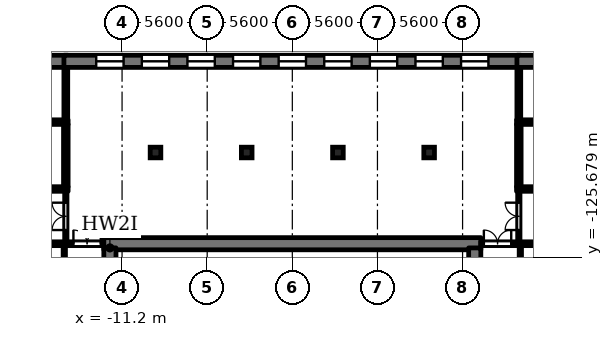
"""IFC4 building model, lengths in metres.
Left out: names, types, materials, properties, quantities, classifications, styles, units other than length and angle.
Written with IfcOpenShell. Run it as: python <this file> out.ifc"""

import sys

from ifc_helpers import new_model, si_unit, direction, frame, frame_2d, origin, origin_2d, place, context, subcontext, project, spatial, rectangle, extrude, element, fill, save


model = new_model("IFC4")
c1 = context("Model", 3, precision=1e-05, world=origin(), true_north=direction((0.0, 1.0)))
c2 = subcontext(c1, "Body", "Model", "MODEL_VIEW")
j1 = project(units=[si_unit("LENGTHUNIT", "METRE"), si_unit("PLANEANGLEUNIT", "RADIAN")], contexts=[c1])
p1 = place(None, origin())
s1 = spatial("IfcSite", under=j1, at=p1, CompositionType="ELEMENT")
p2 = place(p1, origin())
s2 = spatial("IfcBuilding", under=s1, at=p2, CompositionType="ELEMENT")
p3 = place(p2, frame((0.0, 0.0, 16.1)))
s3 = spatial("IfcBuildingStorey", under=s2, at=p3, CompositionType="ELEMENT", Elevation=16.1)
for number, where, z_axis, x_axis in (
    (1, (-9.0, -118.8, 0.0), (0.0, 0.0, 1.0), (1.0, 0.0, 0.0)),
    (2, (-3.0, -118.8, 0.0), (0.0, 0.0, 1.0), (1.0, 0.0, 0.0)),
    (3, (3.0, -118.8, 0.0), (0.0, 0.0, 1.0), (1.0, 0.0, 0.0)),
    (4, (9.0, -118.8, 0.0), (0.0, 0.0, 1.0), (1.0, 0.0, 0.0)),
):
    element("IfcColumn", number, at=place(p3, frame(where, z_axis=z_axis, x_axis=x_axis)), inside=s3, PredefinedType="COLUMN", context=c2, shape_type="SweptSolid", body=[
        extrude(rectangle(XDim=0.7, YDim=0.7, at=origin_2d()), origin(), (0.0, 0.0, 1.0), 4.45),
    ])
p4 = place(p3, frame((-29.2, -124.8, 0.0), z_axis=(0.0, 0.0, 1.0), x_axis=(1.0, 0.0, 0.0)))
e5 = element("IfcWall", 5, at=p4, inside=s3, PredefinedType="SOLIDWALL", context=c2, shape_type="SweptSolid", body=[
    extrude(rectangle(XDim=16.8, YDim=0.25, at=frame_2d((8.4, 0.0))), origin(), (0.0, 0.0, 1.0), 4.45),
])
p5 = place(p4, frame((14.8, 0.0, 0.0)))
e6 = element("IfcOpeningElement", 6, at=p5, cuts=e5, PredefinedType="OPENING", context=c2, shape_type="SweptSolid", body=[
    extrude(rectangle(XDim=1.8, YDim=2.1, at=frame_2d((0.9, 1.05))), frame((0.0, 0.135, 0.0), z_axis=(0.0, -1.0, 0.0), x_axis=(1.0, 0.0, 0.0)), (0.0, 0.0, 1.0), 0.27),
])
p6 = place(p3, frame((-12.4, -124.8, 0.0), z_axis=(0.0, 0.0, 1.0), x_axis=(1.0, 0.0, 0.0)))
e7 = element("IfcWall", 7, at=p6, inside=s3, PredefinedType="SOLIDWALL", context=c2, shape_type="SweptSolid", body=[
    extrude(rectangle(XDim=24.8, YDim=0.8, at=frame_2d((12.4, 0.0))), origin(), (0.0, 0.0, 1.0), 4.8),
])
p7 = place(p3, frame((12.4, -124.8, 0.0), z_axis=(0.0, 0.0, 1.0), x_axis=(1.0, 0.0, 0.0)))
e8 = element("IfcWall", 8, at=p7, inside=s3, PredefinedType="SOLIDWALL", context=c2, shape_type="SweptSolid", body=[
    extrude(rectangle(XDim=16.8, YDim=0.25, at=frame_2d((8.4, 0.0))), origin(), (0.0, 0.0, 1.0), 4.45),
])
p8 = place(p7, frame((0.2, 0.0, 0.0)))
e9 = element("IfcOpeningElement", 9, at=p8, cuts=e8, PredefinedType="OPENING", context=c2, shape_type="SweptSolid", body=[
    extrude(rectangle(XDim=1.8, YDim=2.1, at=frame_2d((0.9, 1.05))), frame((0.0, 0.135, 0.0), z_axis=(0.0, -1.0, 0.0), x_axis=(1.0, 0.0, 0.0)), (0.0, 0.0, 1.0), 0.27),
])
p9 = place(p3, frame((-29.2, -121.2, 0.0), z_axis=(0.0, 0.0, 1.0), x_axis=(1.0, 0.0, 0.0)))
e10 = element("IfcWall", 10, at=p9, inside=s3, PredefinedType="SOLIDWALL", context=c2, shape_type="SweptSolid", body=[
    extrude(rectangle(XDim=14.45, YDim=0.3, at=frame_2d((7.225, 0.0))), origin(), (0.0, 0.0, 1.0), 4.45),
])
p10 = place(p9, frame((4.0, 0.0, 0.0)))
e11 = element("IfcOpeningElement", 11, at=p10, cuts=e10, PredefinedType="OPENING", context=c2, shape_type="SweptSolid", body=[
    extrude(rectangle(XDim=1.1, YDim=2.1, at=frame_2d((0.55, 1.05))), frame((0.0, 0.16, 0.0), z_axis=(0.0, -1.0, 0.0), x_axis=(1.0, 0.0, 0.0)), (0.0, 0.0, 1.0), 0.32),
])
p11 = place(p9, frame((6.5, 0.0, 0.0)))
e12 = element("IfcOpeningElement", 12, at=p11, cuts=e10, PredefinedType="OPENING", context=c2, shape_type="SweptSolid", body=[
    extrude(rectangle(XDim=1.1, YDim=2.1, at=frame_2d((0.55, 1.05))), frame((0.0, 0.16, 0.0), z_axis=(0.0, -1.0, 0.0), x_axis=(1.0, 0.0, 0.0)), (0.0, 0.0, 1.0), 0.32),
])
p12 = place(p9, frame((0.95, 0.0, 0.0)))
e13 = element("IfcOpeningElement", 13, at=p12, cuts=e10, PredefinedType="OPENING", context=c2, shape_type="SweptSolid", body=[
    extrude(rectangle(XDim=1.1, YDim=2.1, at=frame_2d((0.55, 1.05))), frame((0.0, 0.16, 0.0), z_axis=(0.0, -1.0, 0.0), x_axis=(1.0, 0.0, 0.0)), (0.0, 0.0, 1.0), 0.32),
])
p13 = place(p9, frame((10.8, 0.0, 0.0)))
e14 = element("IfcOpeningElement", 14, at=p13, cuts=e10, PredefinedType="OPENING", context=c2, shape_type="SweptSolid", body=[
    extrude(rectangle(XDim=1.0, YDim=2.1, at=frame_2d((0.5, 1.05))), frame((0.0, 0.16, 0.0), z_axis=(0.0, -1.0, 0.0), x_axis=(1.0, 0.0, 0.0)), (0.0, 0.0, 1.0), 0.32),
])
p14 = place(p3, frame((14.75, -121.2, 0.0), z_axis=(0.0, 0.0, 1.0), x_axis=(1.0, 0.0, 0.0)))
e15 = element("IfcWall", 15, at=p14, inside=s3, PredefinedType="SOLIDWALL", context=c2, shape_type="SweptSolid", body=[
    extrude(rectangle(XDim=14.45, YDim=0.3, at=frame_2d((7.225, 0.0))), origin(), (0.0, 0.0, 1.0), 4.45),
])
p15 = place(p14, frame((6.85, 0.0, 0.0)))
e16 = element("IfcOpeningElement", 16, at=p15, cuts=e15, PredefinedType="OPENING", context=c2, shape_type="SweptSolid", body=[
    extrude(rectangle(XDim=1.1, YDim=2.1, at=frame_2d((0.55, 1.05))), frame((0.0, 0.16, 0.0), z_axis=(0.0, -1.0, 0.0), x_axis=(1.0, 0.0, 0.0)), (0.0, 0.0, 1.0), 0.32),
])
p16 = place(p14, frame((9.35, 0.0, 0.0)))
e17 = element("IfcOpeningElement", 17, at=p16, cuts=e15, PredefinedType="OPENING", context=c2, shape_type="SweptSolid", body=[
    extrude(rectangle(XDim=1.1, YDim=2.1, at=frame_2d((0.55, 1.05))), frame((0.0, 0.16, 0.0), z_axis=(0.0, -1.0, 0.0), x_axis=(1.0, 0.0, 0.0)), (0.0, 0.0, 1.0), 0.32),
])
p17 = place(p14, frame((12.4, 0.0, 0.0)))
e18 = element("IfcOpeningElement", 18, at=p17, cuts=e15, PredefinedType="OPENING", context=c2, shape_type="SweptSolid", body=[
    extrude(rectangle(XDim=1.1, YDim=2.1, at=frame_2d((0.55, 1.05))), frame((0.0, 0.16, 0.0), z_axis=(0.0, -1.0, 0.0), x_axis=(1.0, 0.0, 0.0)), (0.0, 0.0, 1.0), 0.32),
])
p18 = place(p14, frame((2.65, 0.0, 0.0)))
e19 = element("IfcOpeningElement", 19, at=p18, cuts=e15, PredefinedType="OPENING", context=c2, shape_type="SweptSolid", body=[
    extrude(rectangle(XDim=1.0, YDim=2.1, at=frame_2d((0.5, 1.05))), frame((0.0, 0.16, 0.0), z_axis=(0.0, -1.0, 0.0), x_axis=(1.0, 0.0, 0.0)), (0.0, 0.0, 1.0), 0.32),
])
for number, where, z_axis, x_axis in (
    (20, (-25.75, -116.8, 0.0), (0.0, 0.0, 1.0), (1.0, 0.0, 0.0)),
    (21, (14.75, -116.8, 0.0), (0.0, 0.0, 1.0), (1.0, 0.0, 0.0)),
):
    element("IfcWall", number, at=place(p3, frame(where, z_axis=z_axis, x_axis=x_axis)), inside=s3, PredefinedType="SOLIDWALL", context=c2, shape_type="SweptSolid", body=[
        extrude(rectangle(XDim=11.0, YDim=0.3, at=frame_2d((5.5, 0.0))), origin(), (0.0, 0.0, 1.0), 4.45),
    ])
p19 = place(p3, frame((-26.05, -112.8, 0.0), z_axis=(0.0, 0.0, 1.0), x_axis=(1.0, 0.0, 0.0)))
e22 = element("IfcWall", 22, at=p19, inside=s3, PredefinedType="SOLIDWALL", context=c2, shape_type="SweptSolid", body=[
    extrude(rectangle(XDim=11.275, YDim=0.8, at=frame_2d((5.637, 0.0))), origin(), (0.0, 0.0, 1.0), 4.45),
])
p20 = place(p3, frame((-15.025, -112.8, 0.0), z_axis=(0.0, 0.0, 1.0), x_axis=(1.0, 0.0, 0.0)))
e23 = element("IfcWall", 23, at=p20, inside=s3, PredefinedType="SOLIDWALL", context=c2, shape_type="SweptSolid", body=[
    extrude(rectangle(XDim=30.05, YDim=0.8, at=frame_2d((15.025, 0.0))), origin(), (0.0, 0.0, 1.0), 4.45),
])
p21 = place(p20, frame((2.125, 0.0, 0.9)))
e24 = element("IfcOpeningElement", 24, at=p21, cuts=e23, PredefinedType="OPENING", context=c2, shape_type="SweptSolid", body=[
    extrude(rectangle(XDim=1.8, YDim=1.5, at=frame_2d((0.9, 0.75))), frame((0.0, 0.41, 0.0), z_axis=(0.0, -1.0, 0.0), x_axis=(1.0, 0.0, 0.0)), (0.0, 0.0, 1.0), 0.82),
])
p22 = place(p20, frame((5.125, 0.0, 0.9)))
e25 = element("IfcOpeningElement", 25, at=p22, cuts=e23, PredefinedType="OPENING", context=c2, shape_type="SweptSolid", body=[
    extrude(rectangle(XDim=1.8, YDim=1.5, at=frame_2d((0.9, 0.75))), frame((0.0, 0.41, 0.0), z_axis=(0.0, -1.0, 0.0), x_axis=(1.0, 0.0, 0.0)), (0.0, 0.0, 1.0), 0.82),
])
p23 = place(p20, frame((8.125, 0.0, 0.9)))
e26 = element("IfcOpeningElement", 26, at=p23, cuts=e23, PredefinedType="OPENING", context=c2, shape_type="SweptSolid", body=[
    extrude(rectangle(XDim=1.8, YDim=1.5, at=frame_2d((0.9, 0.75))), frame((0.0, 0.41, 0.0), z_axis=(0.0, -1.0, 0.0), x_axis=(1.0, 0.0, 0.0)), (0.0, 0.0, 1.0), 0.82),
])
p24 = place(p20, frame((11.125, 0.0, 0.9)))
e27 = element("IfcOpeningElement", 27, at=p24, cuts=e23, PredefinedType="OPENING", context=c2, shape_type="SweptSolid", body=[
    extrude(rectangle(XDim=1.8, YDim=1.5, at=frame_2d((0.9, 0.75))), frame((0.0, 0.41, 0.0), z_axis=(0.0, -1.0, 0.0), x_axis=(1.0, 0.0, 0.0)), (0.0, 0.0, 1.0), 0.82),
])
p25 = place(p20, frame((14.125, 0.0, 0.9)))
e28 = element("IfcOpeningElement", 28, at=p25, cuts=e23, PredefinedType="OPENING", context=c2, shape_type="SweptSolid", body=[
    extrude(rectangle(XDim=1.8, YDim=1.5, at=frame_2d((0.9, 0.75))), frame((0.0, 0.41, 0.0), z_axis=(0.0, -1.0, 0.0), x_axis=(1.0, 0.0, 0.0)), (0.0, 0.0, 1.0), 0.82),
])
p26 = place(p20, frame((17.125, 0.0, 0.9)))
e29 = element("IfcOpeningElement", 29, at=p26, cuts=e23, PredefinedType="OPENING", context=c2, shape_type="SweptSolid", body=[
    extrude(rectangle(XDim=1.8, YDim=1.5, at=frame_2d((0.9, 0.75))), frame((0.0, 0.41, 0.0), z_axis=(0.0, -1.0, 0.0), x_axis=(1.0, 0.0, 0.0)), (0.0, 0.0, 1.0), 0.82),
])
p27 = place(p20, frame((20.125, 0.0, 0.9)))
e30 = element("IfcOpeningElement", 30, at=p27, cuts=e23, PredefinedType="OPENING", context=c2, shape_type="SweptSolid", body=[
    extrude(rectangle(XDim=1.8, YDim=1.5, at=frame_2d((0.9, 0.75))), frame((0.0, 0.41, 0.0), z_axis=(0.0, -1.0, 0.0), x_axis=(1.0, 0.0, 0.0)), (0.0, 0.0, 1.0), 0.82),
])
p28 = place(p20, frame((23.125, 0.0, 0.9)))
e31 = element("IfcOpeningElement", 31, at=p28, cuts=e23, PredefinedType="OPENING", context=c2, shape_type="SweptSolid", body=[
    extrude(rectangle(XDim=1.8, YDim=1.5, at=frame_2d((0.9, 0.75))), frame((0.0, 0.41, 0.0), z_axis=(0.0, -1.0, 0.0), x_axis=(1.0, 0.0, 0.0)), (0.0, 0.0, 1.0), 0.82),
])
p29 = place(p20, frame((26.125, 0.0, 0.9)))
e32 = element("IfcOpeningElement", 32, at=p29, cuts=e23, PredefinedType="OPENING", context=c2, shape_type="SweptSolid", body=[
    extrude(rectangle(XDim=1.8, YDim=1.5, at=frame_2d((0.9, 0.75))), frame((0.0, 0.41, 0.0), z_axis=(0.0, -1.0, 0.0), x_axis=(1.0, 0.0, 0.0)), (0.0, 0.0, 1.0), 0.82),
])
p30 = place(p3, frame((14.775, -112.8, 0.0), z_axis=(0.0, 0.0, 1.0), x_axis=(1.0, 0.0, 0.0)))
e33 = element("IfcWall", 33, at=p30, inside=s3, PredefinedType="SOLIDWALL", context=c2, shape_type="SweptSolid", body=[
    extrude(rectangle(XDim=11.275, YDim=0.8, at=frame_2d((5.637, 0.0))), origin(), (0.0, 0.0, 1.0), 4.45),
])
p31 = place(p3, frame((-15.0, -131.075, 0.0), z_axis=(0.0, 0.0, 1.0), x_axis=(0.0, 1.0, 0.0)))
e34 = element("IfcWall", 34, at=p31, inside=s3, PredefinedType="PARTITIONING", context=c2, shape_type="SweptSolid", body=[
    extrude(rectangle(XDim=6.15, YDim=0.15, at=frame_2d((3.075, 0.0))), origin(), (0.0, 0.0, 1.0), 4.45),
])
p32 = place(p3, frame((-14.9, -124.675, 0.0), z_axis=(0.0, 0.0, 1.0), x_axis=(0.0, 1.0, 0.0)))
e35 = element("IfcWall", 35, at=p32, inside=s3, PredefinedType="PARTITIONING", context=c2, shape_type="SweptSolid", body=[
    extrude(rectangle(XDim=3.325, YDim=0.15, at=frame_2d((1.663, 0.0))), origin(), (0.0, 0.0, 1.0), 4.45),
])
p33 = place(p32, frame((0.775, 0.0, 0.0)))
e36 = element("IfcOpeningElement", 36, at=p33, cuts=e35, PredefinedType="OPENING", context=c2, shape_type="SweptSolid", body=[
    extrude(rectangle(XDim=1.8, YDim=2.1, at=frame_2d((0.9, 1.05))), frame((0.0, 0.085, 0.0), z_axis=(0.0, -1.0, 0.0), x_axis=(1.0, 0.0, 0.0)), (0.0, 0.0, 1.0), 0.17),
])
p34 = place(p3, frame((-14.9, -121.05, 0.0), z_axis=(0.0, 0.0, 1.0), x_axis=(0.0, 1.0, 0.0)))
e37 = element("IfcWall", 37, at=p34, inside=s3, PredefinedType="SOLIDWALL", context=c2, shape_type="SweptSolid", body=[
    extrude(rectangle(XDim=4.1, YDim=0.3, at=frame_2d((2.05, 0.0))), origin(), (0.0, 0.0, 1.0), 4.45),
])
p35 = place(p3, frame((-14.9, -116.65, 0.0), z_axis=(0.0, 0.0, 1.0), x_axis=(0.0, 1.0, 0.0)))
e38 = element("IfcWall", 38, at=p35, inside=s3, PredefinedType="SOLIDWALL", context=c2, shape_type="SweptSolid", body=[
    extrude(rectangle(XDim=3.45, YDim=0.25, at=frame_2d((1.725, 0.0))), origin(), (0.0, 0.0, 1.0), 4.45),
])
for number, where, z_axis, x_axis in (
    (39, (-12.0, -159.2, 0.0), (0.0, 0.0, 1.0), (0.0, 1.0, 0.0)),
    (40, (12.0, -159.2, 0.0), (0.0, 0.0, 1.0), (0.0, 1.0, 0.0)),
):
    element("IfcWall", number, at=place(p3, frame(where, z_axis=z_axis, x_axis=x_axis)), inside=s3, PredefinedType="SOLIDWALL", context=c2, shape_type="SweptSolid", body=[
        extrude(rectangle(XDim=34.125, YDim=0.8, at=frame_2d((17.062, 0.0))), origin(), (0.0, 0.0, 1.0), 4.8),
    ])
p36 = place(p3, frame((14.9, -124.675, 0.0), z_axis=(0.0, 0.0, 1.0), x_axis=(0.0, 1.0, 0.0)))
e41 = element("IfcWall", 41, at=p36, inside=s3, PredefinedType="PARTITIONING", context=c2, shape_type="SweptSolid", body=[
    extrude(rectangle(XDim=3.325, YDim=0.15, at=frame_2d((1.663, 0.0))), origin(), (0.0, 0.0, 1.0), 4.45),
])
p37 = place(p36, frame((0.775, 0.0, 0.0)))
e42 = element("IfcOpeningElement", 42, at=p37, cuts=e41, PredefinedType="OPENING", context=c2, shape_type="SweptSolid", body=[
    extrude(rectangle(XDim=1.8, YDim=2.1, at=frame_2d((0.9, 1.05))), frame((0.0, 0.085, 0.0), z_axis=(0.0, -1.0, 0.0), x_axis=(1.0, 0.0, 0.0)), (0.0, 0.0, 1.0), 0.17),
])
p38 = place(p3, frame((14.9, -121.05, 0.0), z_axis=(0.0, 0.0, 1.0), x_axis=(0.0, 1.0, 0.0)))
e43 = element("IfcWall", 43, at=p38, inside=s3, PredefinedType="SOLIDWALL", context=c2, shape_type="SweptSolid", body=[
    extrude(rectangle(XDim=4.1, YDim=0.3, at=frame_2d((2.05, 0.0))), origin(), (0.0, 0.0, 1.0), 4.45),
])
p39 = place(p3, frame((14.9, -116.65, 0.0), z_axis=(0.0, 0.0, 1.0), x_axis=(0.0, 1.0, 0.0)))
e44 = element("IfcWall", 44, at=p39, inside=s3, PredefinedType="SOLIDWALL", context=c2, shape_type="SweptSolid", body=[
    extrude(rectangle(XDim=3.45, YDim=0.25, at=frame_2d((1.725, 0.0))), origin(), (0.0, 0.0, 1.0), 4.45),
])
p40 = place(p3, frame((15.0, -131.075, 0.0), z_axis=(0.0, 0.0, 1.0), x_axis=(0.0, 1.0, 0.0)))
e45 = element("IfcWall", 45, at=p40, inside=s3, PredefinedType="PARTITIONING", context=c2, shape_type="SweptSolid", body=[
    extrude(rectangle(XDim=6.15, YDim=0.15, at=frame_2d((3.075, 0.0))), origin(), (0.0, 0.0, 1.0), 4.45),
])
p41 = place(p40, frame((2.575, 0.0, 0.0)))
e46 = element("IfcOpeningElement", 46, at=p41, cuts=e45, PredefinedType="OPENING", context=c2, shape_type="SweptSolid", body=[
    extrude(rectangle(XDim=1.0, YDim=2.1, at=frame_2d((0.5, 1.05))), frame((0.0, 0.085, 0.0), z_axis=(0.0, -1.0, 0.0), x_axis=(1.0, 0.0, 0.0)), (0.0, 0.0, 1.0), 0.17),
])
p42 = place(p21, origin())
e47 = element("IfcWindow", 47, at=p42, inside=s3, PartitioningType="SINGLE_PANEL", PredefinedType="WINDOW", context=c2, shape_type="SweptSolid", body=[
    extrude(rectangle(XDim=1.8, YDim=1.5, at=frame_2d((0.9, 0.75))), frame((0.0, 0.03, 0.0), z_axis=(0.0, -1.0, 0.0), x_axis=(1.0, 0.0, 0.0)), (0.0, 0.0, 1.0), 0.06),
])
fill(e24, e47)
p43 = place(p22, origin())
e48 = element("IfcWindow", 48, at=p43, inside=s3, PartitioningType="SINGLE_PANEL", PredefinedType="WINDOW", context=c2, shape_type="SweptSolid", body=[
    extrude(rectangle(XDim=1.8, YDim=1.5, at=frame_2d((0.9, 0.75))), frame((0.0, 0.03, 0.0), z_axis=(0.0, -1.0, 0.0), x_axis=(1.0, 0.0, 0.0)), (0.0, 0.0, 1.0), 0.06),
])
fill(e25, e48)
p44 = place(p23, origin())
e49 = element("IfcWindow", 49, at=p44, inside=s3, PartitioningType="SINGLE_PANEL", PredefinedType="WINDOW", context=c2, shape_type="SweptSolid", body=[
    extrude(rectangle(XDim=1.8, YDim=1.5, at=frame_2d((0.9, 0.75))), frame((0.0, 0.03, 0.0), z_axis=(0.0, -1.0, 0.0), x_axis=(1.0, 0.0, 0.0)), (0.0, 0.0, 1.0), 0.06),
])
fill(e26, e49)
p45 = place(p24, origin())
e50 = element("IfcWindow", 50, at=p45, inside=s3, PartitioningType="SINGLE_PANEL", PredefinedType="WINDOW", context=c2, shape_type="SweptSolid", body=[
    extrude(rectangle(XDim=1.8, YDim=1.5, at=frame_2d((0.9, 0.75))), frame((0.0, 0.03, 0.0), z_axis=(0.0, -1.0, 0.0), x_axis=(1.0, 0.0, 0.0)), (0.0, 0.0, 1.0), 0.06),
])
fill(e27, e50)
p46 = place(p25, origin())
e51 = element("IfcWindow", 51, at=p46, inside=s3, PartitioningType="SINGLE_PANEL", PredefinedType="WINDOW", context=c2, shape_type="SweptSolid", body=[
    extrude(rectangle(XDim=1.8, YDim=1.5, at=frame_2d((0.9, 0.75))), frame((0.0, 0.03, 0.0), z_axis=(0.0, -1.0, 0.0), x_axis=(1.0, 0.0, 0.0)), (0.0, 0.0, 1.0), 0.06),
])
fill(e28, e51)
p47 = place(p26, origin())
e52 = element("IfcWindow", 52, at=p47, inside=s3, PartitioningType="SINGLE_PANEL", PredefinedType="WINDOW", context=c2, shape_type="SweptSolid", body=[
    extrude(rectangle(XDim=1.8, YDim=1.5, at=frame_2d((0.9, 0.75))), frame((0.0, 0.03, 0.0), z_axis=(0.0, -1.0, 0.0), x_axis=(1.0, 0.0, 0.0)), (0.0, 0.0, 1.0), 0.06),
])
fill(e29, e52)
p48 = place(p27, origin())
e53 = element("IfcWindow", 53, at=p48, inside=s3, PartitioningType="SINGLE_PANEL", PredefinedType="WINDOW", context=c2, shape_type="SweptSolid", body=[
    extrude(rectangle(XDim=1.8, YDim=1.5, at=frame_2d((0.9, 0.75))), frame((0.0, 0.03, 0.0), z_axis=(0.0, -1.0, 0.0), x_axis=(1.0, 0.0, 0.0)), (0.0, 0.0, 1.0), 0.06),
])
fill(e30, e53)
p49 = place(p28, origin())
e54 = element("IfcWindow", 54, at=p49, inside=s3, PartitioningType="SINGLE_PANEL", PredefinedType="WINDOW", context=c2, shape_type="SweptSolid", body=[
    extrude(rectangle(XDim=1.8, YDim=1.5, at=frame_2d((0.9, 0.75))), frame((0.0, 0.03, 0.0), z_axis=(0.0, -1.0, 0.0), x_axis=(1.0, 0.0, 0.0)), (0.0, 0.0, 1.0), 0.06),
])
fill(e31, e54)
p50 = place(p29, origin())
e55 = element("IfcWindow", 55, at=p50, inside=s3, PartitioningType="SINGLE_PANEL", PredefinedType="WINDOW", context=c2, shape_type="SweptSolid", body=[
    extrude(rectangle(XDim=1.8, YDim=1.5, at=frame_2d((0.9, 0.75))), frame((0.0, 0.03, 0.0), z_axis=(0.0, -1.0, 0.0), x_axis=(1.0, 0.0, 0.0)), (0.0, 0.0, 1.0), 0.06),
])
fill(e32, e55)
p51 = place(p33, origin())
e56 = element("IfcDoor", 56, at=p51, inside=s3, OperationType="DOUBLE_DOOR_SINGLE_SWING", PredefinedType="DOOR", context=c2, shape_type="SweptSolid", body=[
    extrude(rectangle(XDim=1.8, YDim=2.1, at=frame_2d((0.9, 1.05))), frame((0.0, 0.025, 0.0), z_axis=(0.0, -1.0, 0.0), x_axis=(1.0, 0.0, 0.0)), (0.0, 0.0, 1.0), 0.05),
])
fill(e36, e56)
p52 = place(p37, origin())
e57 = element("IfcDoor", 57, at=p52, inside=s3, OperationType="DOUBLE_DOOR_SINGLE_SWING", PredefinedType="DOOR", context=c2, shape_type="SweptSolid", body=[
    extrude(rectangle(XDim=1.8, YDim=2.1, at=frame_2d((0.9, 1.05))), frame((0.0, 0.025, 0.0), z_axis=(0.0, -1.0, 0.0), x_axis=(1.0, 0.0, 0.0)), (0.0, 0.0, 1.0), 0.05),
])
fill(e42, e57)
p53 = place(p5, origin())
e58 = element("IfcDoor", 58, at=p53, inside=s3, OperationType="DOUBLE_DOOR_SINGLE_SWING", PredefinedType="DOOR", context=c2, shape_type="SweptSolid", body=[
    extrude(rectangle(XDim=1.8, YDim=2.1, at=frame_2d((0.9, 1.05))), frame((0.0, 0.025, 0.0), z_axis=(0.0, -1.0, 0.0), x_axis=(1.0, 0.0, 0.0)), (0.0, 0.0, 1.0), 0.05),
])
fill(e6, e58)
p54 = place(p8, origin())
e59 = element("IfcDoor", 59, at=p54, inside=s3, OperationType="DOUBLE_DOOR_SINGLE_SWING", PredefinedType="DOOR", context=c2, shape_type="SweptSolid", body=[
    extrude(rectangle(XDim=1.8, YDim=2.1, at=frame_2d((0.9, 1.05))), frame((0.0, 0.025, 0.0), z_axis=(0.0, -1.0, 0.0), x_axis=(1.0, 0.0, 0.0)), (0.0, 0.0, 1.0), 0.05),
])
fill(e9, e59)
save(model, sys.argv[1])
